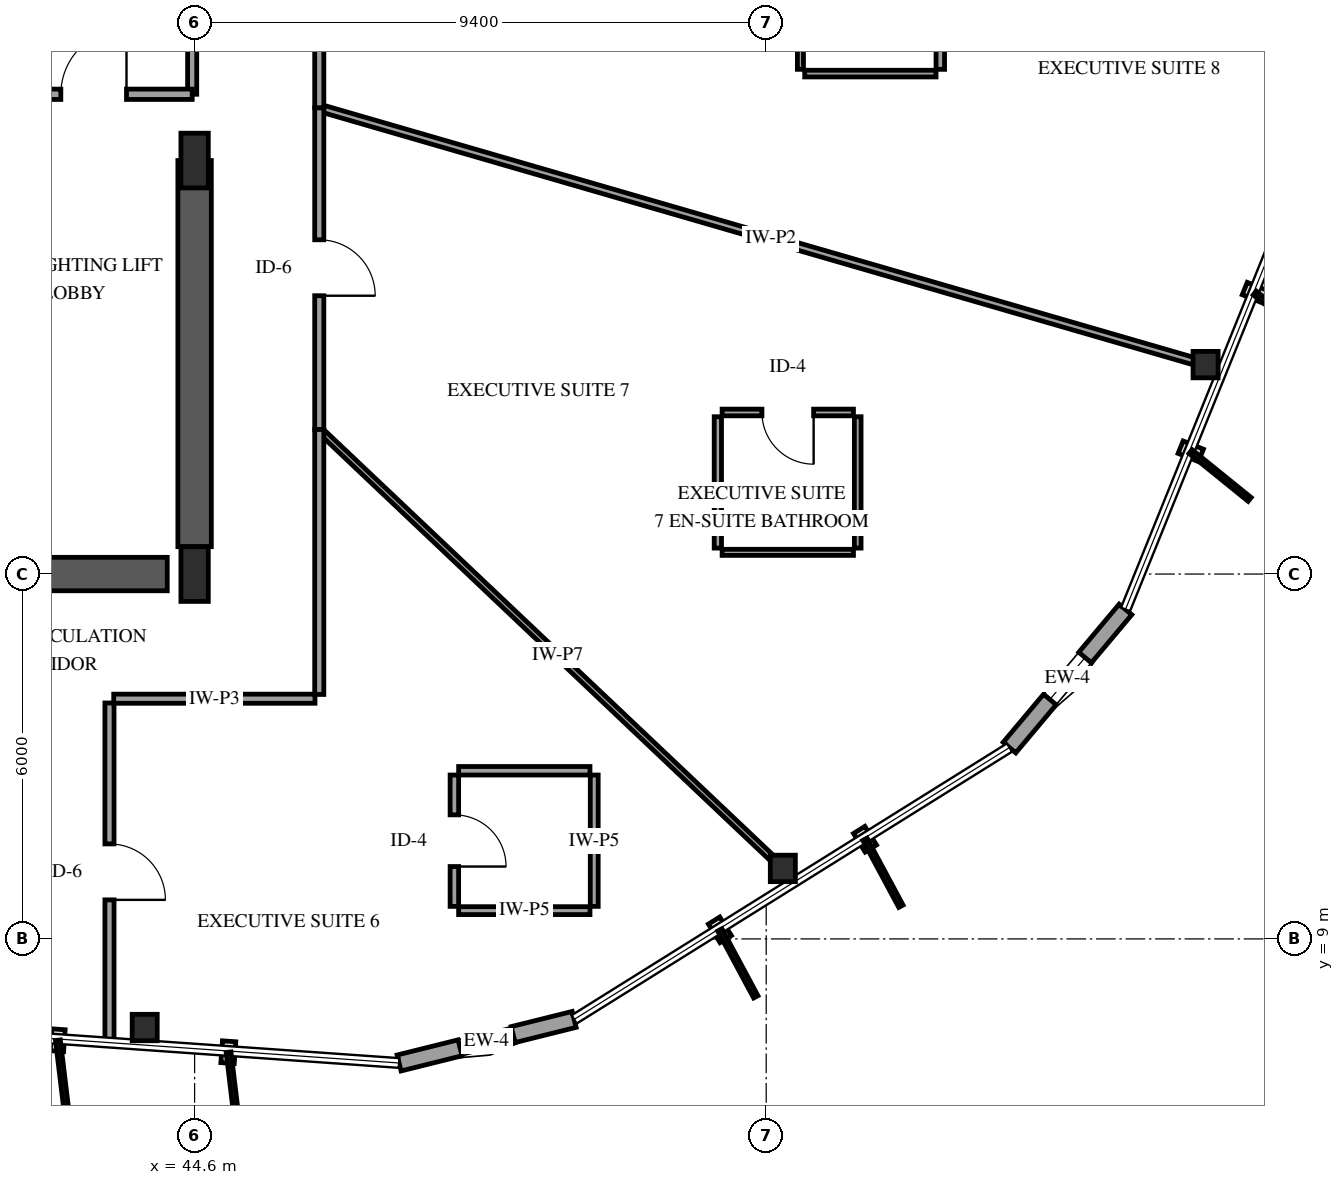
"""IFC4 building model, lengths in metres.
Left out: names, types, materials, properties, quantities, classifications, styles, units other than length and angle.
Written with IfcOpenShell. Run it as: python <this file> out.ifc"""

import sys

from ifc_helpers import new_model, si_unit, direction, frame, frame_2d, origin, origin_2d, place, context, subcontext, project, spatial, rectangle, i_section, extrude, element, fill, save


model = new_model("IFC4")
c1 = context("Model", 3, precision=1e-05, world=origin(), true_north=direction((0.0, 1.0)))
c2 = subcontext(c1, "Body", "Model", "MODEL_VIEW")
j1 = project(units=[si_unit("LENGTHUNIT", "METRE"), si_unit("PLANEANGLEUNIT", "RADIAN")], contexts=[c1])
p1 = place(None, origin())
s1 = spatial("IfcSite", under=j1, at=p1, CompositionType="ELEMENT")
p2 = place(p1, origin())
s2 = spatial("IfcBuilding", under=s1, at=p2, CompositionType="ELEMENT")
p3 = place(p2, frame((0.0, 0.0, 157.0)))
s3 = spatial("IfcBuildingStorey", under=s2, at=p3, CompositionType="ELEMENT", Elevation=157.0)
p4 = place(p3, frame((41.3, 15.0, 0.0), z_axis=(0.0, 0.0, 1.0), x_axis=(1.0, 0.0, 0.0)))
e1 = element("IfcWall", 1, at=p4, inside=s3, PredefinedType="SHEAR", context=c2, shape_type="SweptSolid", body=[
    extrude(rectangle(XDim=2.85, YDim=0.55, at=frame_2d((1.425, 0.0))), origin(), (0.0, 0.0, 1.0), 3.6),
])
p5 = place(p3, frame((44.6, 15.45, 0.0), z_axis=(0.0, 0.0, 1.0), x_axis=(0.0, 1.0, 0.0)))
e2 = element("IfcWall", 2, at=p5, inside=s3, PredefinedType="SHEAR", context=c2, shape_type="SweptSolid", body=[
    extrude(rectangle(XDim=6.35, YDim=0.55, at=frame_2d((3.175, 0.0))), origin(), (0.0, 0.0, 1.0), 3.6),
])
for number, where, z_axis, x_axis in (
    (3, (44.6, 15.0, 0.0), (0.0, 0.0, 1.0), (1.0, 0.0, 0.0)),
    (4, (44.6, 21.8, 0.0), (0.0, 0.0, 1.0), (1.0, 0.0, 0.0)),
):
    element("IfcColumn", number, at=place(p3, frame(where, z_axis=z_axis, x_axis=x_axis)), inside=s3, PredefinedType="PILASTER", context=c2, shape_type="SweptSolid", body=[
        extrude(rectangle(XDim=0.45, YDim=0.9, at=origin_2d()), origin(), (0.0, 0.0, 1.0), 3.6),
    ])
for number, where, z_axis, x_axis in (
    (5, (43.779, 7.542, 0.0), (0.0, 0.0, 1.0), (1.0, 0.0, 0.0)),
    (6, (54.274, 10.159, 0.0), (0.0, 0.0, 1.0), (1.0, 0.0, 0.0)),
    (7, (61.226, 18.444, 0.0), (0.0, 0.0, 1.0), (1.0, 0.0, 0.0)),
):
    element("IfcColumn", number, at=place(p3, frame(where, z_axis=z_axis, x_axis=x_axis)), inside=s3, PredefinedType="COLUMN", context=c2, shape_type="SweptSolid", body=[
        extrude(i_section(OverallWidth=0.412, OverallDepth=0.435, WebThickness=0.036, FlangeThickness=0.057, FilletRadius=0.038, at=origin_2d()), origin(), (0.0, 0.0, 1.0), 3.6),
    ])
p6 = place(p3, frame((47.963, 6.959, 0.0), z_axis=(0.0, 0.0, 1.0), x_axis=(0.970388894823, 0.241547909957, 0.0)))
e8 = element("IfcWall", 8, at=p6, inside=s3, PredefinedType="SOLIDWALL", context=c2, shape_type="SweptSolid", body=[
    extrude(rectangle(XDim=2.967, YDim=0.27, at=frame_2d((1.483, 0.0))), origin(), (0.0, 0.0, 1.0), 2.679),
])
p7 = place(p6, frame((1.033, 0.0, 0.75)))
e9 = element("IfcOpeningElement", 9, at=p7, cuts=e8, PredefinedType="OPENING", context=c2, shape_type="SweptSolid", body=[
    extrude(rectangle(XDim=0.9, YDim=1.5, at=frame_2d((0.45, 0.75))), frame((0.0, 0.145, 0.0), z_axis=(0.0, -1.0, 0.0), x_axis=(1.0, 0.0, 0.0)), (0.0, 0.0, 1.0), 0.29),
])
p8 = place(p3, frame((58.001, 12.146, 0.0), z_axis=(0.0, 0.0, 1.0), x_axis=(0.643085925087, 0.765794027762, 0.0)))
e10 = element("IfcWall", 10, at=p8, inside=s3, PredefinedType="SOLIDWALL", context=c2, shape_type="SweptSolid", body=[
    extrude(rectangle(XDim=2.967, YDim=0.27, at=frame_2d((1.483, 0.0))), origin(), (0.0, 0.0, 1.0), 2.679),
])
p9 = place(p8, frame((1.033, 0.0, 0.75)))
e11 = element("IfcOpeningElement", 11, at=p9, cuts=e10, PredefinedType="OPENING", context=c2, shape_type="SweptSolid", body=[
    extrude(rectangle(XDim=0.9, YDim=1.5, at=frame_2d((0.45, 0.75))), frame((0.0, 0.145, 0.0), z_axis=(0.0, -1.0, 0.0), x_axis=(1.0, 0.0, 0.0)), (0.0, 0.0, 1.0), 0.29),
])
p10 = place(p3, frame((46.65, 22.668, 0.0), z_axis=(0.0, 0.0, 1.0), x_axis=(0.960493218243, -0.27830339148, 0.0)))
e12 = element("IfcWall", 12, at=p10, inside=s3, PredefinedType="PARTITIONING", context=c2, shape_type="SweptSolid", body=[
    extrude(rectangle(XDim=15.465, YDim=0.12, at=frame_2d((7.732, 0.0))), origin(), (0.0, 0.0, 1.0), 3.3),
])
p11 = place(p3, frame((46.65, 17.377, 0.0), z_axis=(0.0, 0.0, 1.0), x_axis=(0.726165374711, -0.687520071395, 0.0)))
e13 = element("IfcWall", 13, at=p11, inside=s3, PredefinedType="PARTITIONING", context=c2, shape_type="SweptSolid", body=[
    extrude(rectangle(XDim=10.797, YDim=0.1, at=frame_2d((5.398, 0.0))), origin(), (0.0, 0.0, 1.0), 2.595),
])
p12 = place(p3, frame((44.56, 29.8, 0.0), z_axis=(0.0, 0.0, 1.0), x_axis=(0.0, -1.0, 0.0)))
e14 = element("IfcWall", 14, at=p12, inside=s3, PredefinedType="PARTITIONING", context=c2, shape_type="SweptSolid", body=[
    extrude(rectangle(XDim=6.91, YDim=0.15, at=frame_2d((3.455, 0.0))), origin(), (0.0, 0.0, 1.0), 2.34),
])
p13 = place(p12, frame((2.915, 0.0, 0.0)))
e15 = element("IfcOpeningElement", 15, at=p13, cuts=e14, PredefinedType="OPENING", context=c2, shape_type="SweptSolid", body=[
    extrude(rectangle(XDim=1.08, YDim=2.15, at=frame_2d((0.54, 1.075))), frame((0.0, 0.085, 0.0), z_axis=(0.0, -1.0, 0.0), x_axis=(1.0, 0.0, 0.0)), (0.0, 0.0, 1.0), 0.17),
])
p14 = place(p3, frame((43.2, 12.88, 0.0), z_axis=(0.0, 0.0, 1.0), x_axis=(0.0, -1.0, 0.0)))
e16 = element("IfcWall", 16, at=p14, inside=s3, PredefinedType="PARTITIONING", context=c2, shape_type="SweptSolid", body=[
    extrude(rectangle(XDim=5.586, YDim=0.15, at=frame_2d((2.793, 0.0))), origin(), (0.0, 0.0, 1.0), 2.595),
])
p15 = place(p14, frame((2.318, 0.0, 0.0)))
e17 = element("IfcOpeningElement", 17, at=p15, cuts=e16, PredefinedType="OPENING", context=c2, shape_type="SweptSolid", body=[
    extrude(rectangle(XDim=0.92, YDim=2.12, at=frame_2d((0.46, 1.06))), frame((0.0, 0.085, 0.0), z_axis=(0.0, -1.0, 0.0), x_axis=(1.0, 0.0, 0.0)), (0.0, 0.0, 1.0), 0.17),
])
p16 = place(p3, frame((46.65, 22.668, 0.0), z_axis=(0.0, 0.0, 1.0), x_axis=(0.0, -1.0, 0.0)))
e18 = element("IfcWall", 18, at=p16, inside=s3, PredefinedType="PARTITIONING", context=c2, shape_type="SweptSolid", body=[
    extrude(rectangle(XDim=5.291, YDim=0.15, at=frame_2d((2.646, 0.0))), origin(), (0.0, 0.0, 1.0), 3.3),
])
p17 = place(p16, frame((2.171, 0.0, 0.0)))
e19 = element("IfcOpeningElement", 19, at=p17, cuts=e18, PredefinedType="OPENING", context=c2, shape_type="SweptSolid", body=[
    extrude(rectangle(XDim=0.92, YDim=2.12, at=frame_2d((0.46, 1.06))), frame((0.0, 0.085, 0.0), z_axis=(0.0, -1.0, 0.0), x_axis=(1.0, 0.0, 0.0)), (0.0, 0.0, 1.0), 0.17),
])
p18 = place(p3, frame((46.65, 17.377, 0.0), z_axis=(0.0, 0.0, 1.0), x_axis=(0.0, -1.0, 0.0)))
e20 = element("IfcWall", 20, at=p18, inside=s3, PredefinedType="PARTITIONING", context=c2, shape_type="SweptSolid", body=[
    extrude(rectangle(XDim=4.357, YDim=0.15, at=frame_2d((2.178, 0.0))), origin(), (0.0, 0.0, 1.0), 3.3),
])
p19 = place(p3, frame((46.65, 26.458, 0.0), z_axis=(0.0, 0.0, 1.0), x_axis=(0.0, -1.0, 0.0)))
e21 = element("IfcWall", 21, at=p19, inside=s3, PredefinedType="PARTITIONING", context=c2, shape_type="SweptSolid", body=[
    extrude(rectangle(XDim=3.79, YDim=0.15, at=frame_2d((1.895, 0.0))), origin(), (0.0, 0.0, 1.0), 3.3),
])
p20 = place(p19, frame((1.42, 0.0, 0.0)))
e22 = element("IfcOpeningElement", 22, at=p20, cuts=e21, PredefinedType="OPENING", context=c2, shape_type="SweptSolid", body=[
    extrude(rectangle(XDim=0.92, YDim=2.12, at=frame_2d((0.46, 1.06))), frame((0.0, 0.085, 0.0), z_axis=(0.0, -1.0, 0.0), x_axis=(1.0, 0.0, 0.0)), (0.0, 0.0, 1.0), 0.17),
])
p21 = place(p3, frame((46.58, 12.95, 0.0), z_axis=(0.0, 0.0, 1.0), x_axis=(-1.0, 0.0, 0.0)))
e23 = element("IfcWall", 23, at=p21, inside=s3, PredefinedType="PARTITIONING", context=c2, shape_type="SweptSolid", body=[
    extrude(rectangle(XDim=3.31, YDim=0.15, at=frame_2d((1.655, 0.0))), origin(), (0.0, 0.0, 1.0), 3.3),
])
p22 = place(p3, frame((41.32, 22.89, 0.0), z_axis=(0.0, 0.0, 1.0), x_axis=(1.0, 0.0, 0.0)))
e24 = element("IfcWall", 24, at=p22, inside=s3, PredefinedType="PARTITIONING", context=c2, shape_type="SweptSolid", body=[
    extrude(rectangle(XDim=3.24, YDim=0.17, at=frame_2d((1.62, 0.0))), origin(), (0.0, 0.0, 1.0), 3.3),
])
p23 = place(p22, frame((1.08, 0.0, 0.0)))
e25 = element("IfcOpeningElement", 25, at=p23, cuts=e24, PredefinedType="OPENING", context=c2, shape_type="SweptSolid", body=[
    extrude(rectangle(XDim=1.08, YDim=2.15, at=frame_2d((0.54, 1.075))), frame((0.0, 0.095, 0.0), z_axis=(0.0, -1.0, 0.0), x_axis=(1.0, 0.0, 0.0)), (0.0, 0.0, 1.0), 0.19),
])
p24 = place(p3, frame((55.435, 17.657, 0.0), z_axis=(0.0, 0.0, 1.0), x_axis=(-1.0, 0.0, 0.0)))
e26 = element("IfcWall", 26, at=p24, inside=s3, PredefinedType="PARTITIONING", context=c2, shape_type="SweptSolid", body=[
    extrude(rectangle(XDim=2.16, YDim=0.11, at=frame_2d((1.08, 0.0))), origin(), (0.0, 0.0, 1.0), 3.3),
])
p25 = place(p24, frame((0.655, 0.0, 0.0)))
e27 = element("IfcOpeningElement", 27, at=p25, cuts=e26, PredefinedType="OPENING", context=c2, shape_type="SweptSolid", body=[
    extrude(rectangle(XDim=0.85, YDim=2.1, at=frame_2d((0.425, 1.05))), frame((0.0, 0.065, 0.0), z_axis=(0.0, -1.0, 0.0), x_axis=(1.0, 0.0, 0.0)), (0.0, 0.0, 1.0), 0.13),
])
p26 = place(p3, frame((53.275, 15.357, 0.0), z_axis=(0.0, 0.0, 1.0), x_axis=(1.0, 0.0, 0.0)))
e28 = element("IfcWall", 28, at=p26, inside=s3, PredefinedType="PARTITIONING", context=c2, shape_type="SweptSolid", body=[
    extrude(rectangle(XDim=2.16, YDim=0.1, at=frame_2d((1.08, 0.0))), origin(), (0.0, 0.0, 1.0), 3.3),
])
p27 = place(p3, frame((48.872, 11.695, 0.0), z_axis=(0.0, 0.0, 1.0), x_axis=(0.0, -1.0, 0.0)))
e29 = element("IfcWall", 29, at=p27, inside=s3, PredefinedType="PARTITIONING", context=c2, shape_type="SweptSolid", body=[
    extrude(rectangle(XDim=2.16, YDim=0.14, at=frame_2d((1.08, 0.0))), origin(), (0.0, 0.0, 1.0), 3.3),
])
p28 = place(p27, frame((0.655, 0.0, 0.0)))
e30 = element("IfcOpeningElement", 30, at=p28, cuts=e29, PredefinedType="OPENING", context=c2, shape_type="SweptSolid", body=[
    extrude(rectangle(XDim=0.85, YDim=2.1, at=frame_2d((0.425, 1.05))), frame((0.0, 0.08, 0.0), z_axis=(0.0, -1.0, 0.0), x_axis=(1.0, 0.0, 0.0)), (0.0, 0.0, 1.0), 0.16),
])
p29 = place(p3, frame((51.172, 9.535, 0.0), z_axis=(0.0, 0.0, 1.0), x_axis=(0.0, 1.0, 0.0)))
e31 = element("IfcWall", 31, at=p29, inside=s3, PredefinedType="PARTITIONING", context=c2, shape_type="SweptSolid", body=[
    extrude(rectangle(XDim=2.16, YDim=0.13, at=frame_2d((1.08, 0.0))), origin(), (0.0, 0.0, 1.0), 3.3),
])
p30 = place(p3, frame((53.205, 17.587, 0.0), z_axis=(0.0, 0.0, 1.0), x_axis=(0.0, -1.0, 0.0)))
e32 = element("IfcWall", 32, at=p30, inside=s3, PredefinedType="PARTITIONING", context=c2, shape_type="SweptSolid", body=[
    extrude(rectangle(XDim=2.16, YDim=0.12, at=frame_2d((1.08, 0.0))), origin(), (0.0, 0.0, 1.0), 3.3),
])
p31 = place(p3, frame((55.505, 15.427, 0.0), z_axis=(0.0, 0.0, 1.0), x_axis=(0.0, 1.0, 0.0)))
e33 = element("IfcWall", 33, at=p31, inside=s3, PredefinedType="PARTITIONING", context=c2, shape_type="SweptSolid", body=[
    extrude(rectangle(XDim=2.16, YDim=0.11, at=frame_2d((1.08, 0.0))), origin(), (0.0, 0.0, 1.0), 3.3),
])
p32 = place(p3, frame((54.563, 25.46, 0.0), z_axis=(0.0, 0.0, 1.0), x_axis=(0.0, -1.0, 0.0)))
e34 = element("IfcWall", 34, at=p32, inside=s3, PredefinedType="PARTITIONING", context=c2, shape_type="SweptSolid", body=[
    extrude(rectangle(XDim=2.16, YDim=0.1, at=frame_2d((1.08, 0.0))), origin(), (0.0, 0.0, 1.0), 3.3),
])
p33 = place(p32, frame((0.655, 0.0, 0.0)))
e35 = element("IfcOpeningElement", 35, at=p33, cuts=e34, PredefinedType="OPENING", context=c2, shape_type="SweptSolid", body=[
    extrude(rectangle(XDim=0.85, YDim=2.1, at=frame_2d((0.425, 1.05))), frame((0.0, 0.06, 0.0), z_axis=(0.0, -1.0, 0.0), x_axis=(1.0, 0.0, 0.0)), (0.0, 0.0, 1.0), 0.12),
])
p34 = place(p3, frame((56.863, 23.3, 0.0), z_axis=(0.0, 0.0, 1.0), x_axis=(0.0, 1.0, 0.0)))
e36 = element("IfcWall", 36, at=p34, inside=s3, PredefinedType="PARTITIONING", context=c2, shape_type="SweptSolid", body=[
    extrude(rectangle(XDim=2.16, YDim=0.14, at=frame_2d((1.08, 0.0))), origin(), (0.0, 0.0, 1.0), 3.3),
])
p35 = place(p3, frame((51.102, 11.765, 0.0), z_axis=(0.0, 0.0, 1.0), x_axis=(-1.0, 0.0, 0.0)))
e37 = element("IfcWall", 37, at=p35, inside=s3, PredefinedType="PARTITIONING", context=c2, shape_type="SweptSolid", body=[
    extrude(rectangle(XDim=2.16, YDim=0.14, at=frame_2d((1.08, 0.0))), origin(), (0.0, 0.0, 1.0), 3.3),
])
p36 = place(p3, frame((48.942, 9.465, 0.0), z_axis=(0.0, 0.0, 1.0), x_axis=(1.0, 0.0, 0.0)))
e38 = element("IfcWall", 38, at=p36, inside=s3, PredefinedType="PARTITIONING", context=c2, shape_type="SweptSolid", body=[
    extrude(rectangle(XDim=2.16, YDim=0.13, at=frame_2d((1.08, 0.0))), origin(), (0.0, 0.0, 1.0), 2.511),
])
p37 = place(p3, frame((54.633, 23.23, 0.0), z_axis=(0.0, 0.0, 1.0), x_axis=(1.0, 0.0, 0.0)))
e39 = element("IfcWall", 39, at=p37, inside=s3, PredefinedType="PARTITIONING", context=c2, shape_type="SweptSolid", body=[
    extrude(rectangle(XDim=2.16, YDim=0.11, at=frame_2d((1.08, 0.0))), origin(), (0.0, 0.0, 1.0), 3.3),
])
p38 = place(p7, origin())
e40 = element("IfcWindow", 40, at=p38, inside=s3, PartitioningType="SINGLE_PANEL", PredefinedType="WINDOW", context=c2, shape_type="SweptSolid", body=[
    extrude(rectangle(XDim=0.9, YDim=1.5, at=frame_2d((0.45, 0.75))), frame((0.0, 0.03, 0.0), z_axis=(0.0, -1.0, 0.0), x_axis=(1.0, 0.0, 0.0)), (0.0, 0.0, 1.0), 0.06),
])
fill(e9, e40)
p39 = place(p9, origin())
e41 = element("IfcWindow", 41, at=p39, inside=s3, PartitioningType="SINGLE_PANEL", PredefinedType="WINDOW", context=c2, shape_type="SweptSolid", body=[
    extrude(rectangle(XDim=0.9, YDim=1.5, at=frame_2d((0.45, 0.75))), frame((0.0, 0.03, 0.0), z_axis=(0.0, -1.0, 0.0), x_axis=(1.0, 0.0, 0.0)), (0.0, 0.0, 1.0), 0.06),
])
fill(e11, e41)
p40 = place(p15, origin())
e42 = element("IfcDoor", 42, at=p40, inside=s3, OperationType="SINGLE_SWING_RIGHT", PredefinedType="DOOR", context=c2, shape_type="SweptSolid", body=[
    extrude(rectangle(XDim=0.92, YDim=2.12, at=frame_2d((0.46, 1.06))), frame((0.0, 0.025, 0.0), z_axis=(0.0, -1.0, 0.0), x_axis=(1.0, 0.0, 0.0)), (0.0, 0.0, 1.0), 0.05),
])
fill(e17, e42)
p41 = place(p17, origin())
e43 = element("IfcDoor", 43, at=p41, inside=s3, OperationType="SINGLE_SWING_RIGHT", PredefinedType="DOOR", context=c2, shape_type="SweptSolid", body=[
    extrude(rectangle(XDim=0.92, YDim=2.12, at=frame_2d((0.46, 1.06))), frame((0.0, 0.025, 0.0), z_axis=(0.0, -1.0, 0.0), x_axis=(1.0, 0.0, 0.0)), (0.0, 0.0, 1.0), 0.05),
])
fill(e19, e43)
p42 = place(p23, origin())
e44 = element("IfcDoor", 44, at=p42, inside=s3, OperationType="SINGLE_SWING_RIGHT", PredefinedType="DOOR", context=c2, shape_type="SweptSolid", body=[
    extrude(rectangle(XDim=1.08, YDim=2.15, at=frame_2d((0.54, 1.075))), frame((0.0, 0.025, 0.0), z_axis=(0.0, -1.0, 0.0), x_axis=(1.0, 0.0, 0.0)), (0.0, 0.0, 1.0), 0.05),
])
fill(e25, e44)
p43 = place(p25, origin())
e45 = element("IfcDoor", 45, at=p43, inside=s3, OperationType="SINGLE_SWING_LEFT", PredefinedType="DOOR", context=c2, shape_type="SweptSolid", body=[
    extrude(rectangle(XDim=0.85, YDim=2.1, at=frame_2d((0.425, 1.05))), frame((0.0, 0.025, 0.0), z_axis=(0.0, -1.0, 0.0), x_axis=(1.0, 0.0, 0.0)), (0.0, 0.0, 1.0), 0.05),
])
fill(e27, e45)
p44 = place(p28, origin())
e46 = element("IfcDoor", 46, at=p44, inside=s3, OperationType="SINGLE_SWING_RIGHT", PredefinedType="DOOR", context=c2, shape_type="SweptSolid", body=[
    extrude(rectangle(XDim=0.85, YDim=2.1, at=frame_2d((0.425, 1.05))), frame((0.0, 0.025, 0.0), z_axis=(0.0, -1.0, 0.0), x_axis=(1.0, 0.0, 0.0)), (0.0, 0.0, 1.0), 0.05),
])
fill(e30, e46)
save(model, sys.argv[1])
